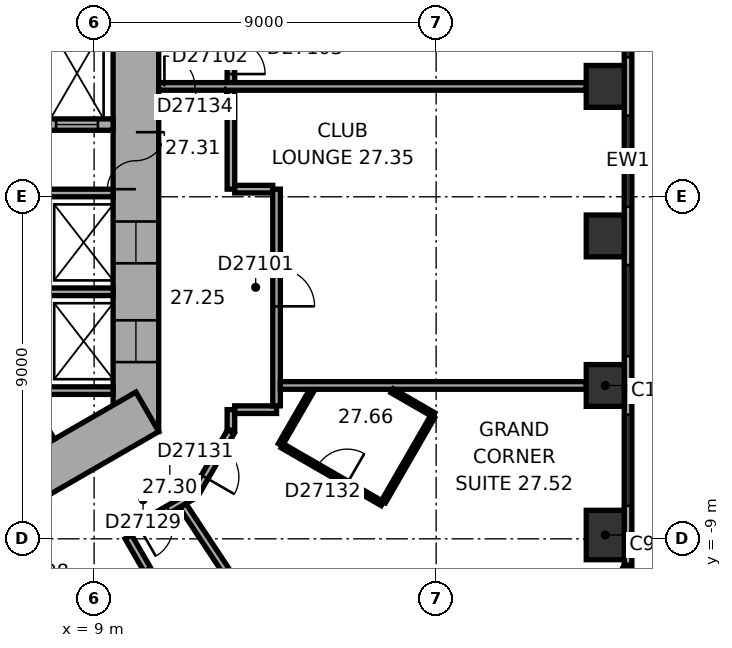
"""IFC4 building model, lengths in metres.
Left out: names, types, materials, properties, quantities, classifications, styles, units other than length and angle.
Written with IfcOpenShell. Run it as: python <this file> out.ifc"""

import sys

from ifc_helpers import new_model, si_unit, direction, frame, frame_2d, origin, origin_2d, place, context, subcontext, project, spatial, rectangle, extrude, element, fill, save


model = new_model("IFC4")
c1 = context("Model", 3, precision=1e-05, world=origin(), true_north=direction((0.0, 1.0)))
c2 = subcontext(c1, "Body", "Model", "MODEL_VIEW")
j1 = project(units=[si_unit("LENGTHUNIT", "METRE"), si_unit("PLANEANGLEUNIT", "RADIAN")], contexts=[c1])
p1 = place(None, origin())
s1 = spatial("IfcSite", under=j1, at=p1, CompositionType="ELEMENT")
p2 = place(p1, origin())
s2 = spatial("IfcBuilding", under=s1, at=p2, CompositionType="ELEMENT")
p3 = place(p2, frame((0.0, 0.0, 113.3)))
s3 = spatial("IfcBuildingStorey", under=s2, at=p3, CompositionType="ELEMENT", Elevation=113.3)
p4 = place(p3, frame((22.45, -8.899, 0.0), z_axis=(0.0, 0.0, 1.0), x_axis=(0.0, 1.0, 0.0)))
e1 = element("IfcColumn", 1, at=p4, inside=s3, PredefinedType="COLUMN", context=c2, shape_type="SweptSolid", body=[
    extrude(rectangle(XDim=1.3, YDim=1.0, at=origin_2d()), origin(), (0.0, 0.0, 1.0), 3.3),
])
for number, where, z_axis, x_axis in (
    (2, (22.45, -4.965, 0.0), (0.0, 0.0, 1.0), (0.0, 1.0, 0.0)),
    (3, (22.45, -1.03, 0.0), (0.0, 0.0, 1.0), (0.0, 1.0, 0.0)),
    (4, (22.45, 2.905, 0.0), (0.0, 0.0, 1.0), (0.0, 1.0, 0.0)),
):
    element("IfcColumn", number, at=place(p3, frame(where, z_axis=z_axis, x_axis=x_axis)), inside=s3, PredefinedType="COLUMN", context=c2, shape_type="SweptSolid", body=[
        extrude(rectangle(XDim=1.1, YDim=1.0, at=origin_2d()), origin(), (0.0, 0.0, 1.0), 3.3),
    ])
p5 = place(p3, frame((10.1, -6.177, 0.0), z_axis=(0.0, 0.0, 1.0), x_axis=(0.0, 1.0, 0.0)))
e5 = element("IfcWall", 5, at=p5, inside=s3, PredefinedType="SHEAR", context=c2, shape_type="SweptSolid", body=[
    extrude(rectangle(XDim=12.355, YDim=1.2, at=frame_2d((6.177, 0.0))), origin(), (0.0, 0.0, 1.0), 3.3),
])
p6 = place(p5, frame((6.378, 0.0, 0.0)))
e6 = element("IfcOpeningElement", 6, at=p6, cuts=e5, PredefinedType="OPENING", context=c2, shape_type="SweptSolid", body=[
    extrude(rectangle(XDim=1.5, YDim=2.1, at=frame_2d((0.75, 1.05))), frame((0.0, 0.61, 0.0), z_axis=(0.0, -1.0, 0.0), x_axis=(1.0, 0.0, 0.0)), (0.0, 0.0, 1.0), 1.22),
])
p7 = place(p5, frame((1.828, 0.0, 0.0)))
e7 = element("IfcOpeningElement", 7, at=p7, cuts=e5, PredefinedType="OPENING", context=c2, shape_type="SweptSolid", body=[
    extrude(rectangle(XDim=1.1, YDim=2.1, at=frame_2d((0.55, 1.05))), frame((0.0, 0.61, 0.0), z_axis=(0.0, -1.0, 0.0), x_axis=(1.0, 0.0, 0.0)), (0.0, 0.0, 1.0), 1.22),
])
p8 = place(p5, frame((4.427, 0.0, 0.0)))
e8 = element("IfcOpeningElement", 8, at=p8, cuts=e5, PredefinedType="OPENING", context=c2, shape_type="SweptSolid", body=[
    extrude(rectangle(XDim=1.1, YDim=2.1, at=frame_2d((0.55, 1.05))), frame((0.0, 0.61, 0.0), z_axis=(0.0, -1.0, 0.0), x_axis=(1.0, 0.0, 0.0)), (0.0, 0.0, 1.0), 1.22),
])
p9 = place(p3, frame((-0.3, -11.836, 0.0), z_axis=(0.0, 0.0, 1.0), x_axis=(0.866021384402, 0.500006961711, 0.0)))
e9 = element("IfcWall", 9, at=p9, inside=s3, PredefinedType="SHEAR", context=c2, shape_type="SweptSolid", body=[
    extrude(rectangle(XDim=12.355, YDim=1.2, at=frame_2d((6.178, 0.0))), origin(), (0.0, 0.0, 1.0), 3.3),
])
p10 = place(p9, frame((4.128, 0.0, 0.0)))
e10 = element("IfcOpeningElement", 10, at=p10, cuts=e9, PredefinedType="OPENING", context=c2, shape_type="SweptSolid", body=[
    extrude(rectangle(XDim=0.9, YDim=2.1, at=frame_2d((0.45, 1.05))), frame((0.0, 0.61, 0.0), z_axis=(0.0, -1.0, 0.0), x_axis=(1.0, 0.0, 0.0)), (0.0, 0.0, 1.0), 1.22),
])
p11 = place(p9, frame((7.928, 0.0, 0.0)))
e11 = element("IfcOpeningElement", 11, at=p11, cuts=e9, PredefinedType="OPENING", context=c2, shape_type="SweptSolid", body=[
    extrude(rectangle(XDim=1.1, YDim=2.1, at=frame_2d((0.55, 1.05))), frame((0.0, 0.61, 0.0), z_axis=(0.0, -1.0, 0.0), x_axis=(1.0, 0.0, 0.0)), (0.0, 0.0, 1.0), 1.22),
])
p12 = place(p3, frame((23.05, -9.687, 0.0), z_axis=(0.0, 0.0, 1.0), x_axis=(0.0, 1.0, 0.0)))
e12 = element("IfcWall", 12, at=p12, inside=s3, PredefinedType="STANDARD", context=c2, shape_type="SweptSolid", body=[
    extrude(rectangle(XDim=21.246, YDim=0.2, at=frame_2d((10.623, 0.0))), origin(), (0.0, 0.0, 1.0), 3.3),
])
p13 = place(p12, frame((1.555, 0.0, 0.8)))
e13 = element("IfcOpeningElement", 13, at=p13, cuts=e12, PredefinedType="OPENING", context=c2, shape_type="SweptSolid", body=[
    extrude(rectangle(XDim=2.4, YDim=1.7, at=frame_2d((1.2, 0.85))), frame((0.0, 0.11, 0.0), z_axis=(0.0, -1.0, 0.0), x_axis=(1.0, 0.0, 0.0)), (0.0, 0.0, 1.0), 0.22),
])
p14 = place(p12, frame((5.489, 0.0, 0.8)))
e14 = element("IfcOpeningElement", 14, at=p14, cuts=e12, PredefinedType="OPENING", context=c2, shape_type="SweptSolid", body=[
    extrude(rectangle(XDim=2.4, YDim=1.7, at=frame_2d((1.2, 0.85))), frame((0.0, 0.11, 0.0), z_axis=(0.0, -1.0, 0.0), x_axis=(1.0, 0.0, 0.0)), (0.0, 0.0, 1.0), 0.22),
])
p15 = place(p12, frame((9.424, 0.0, 0.8)))
e15 = element("IfcOpeningElement", 15, at=p15, cuts=e12, PredefinedType="OPENING", context=c2, shape_type="SweptSolid", body=[
    extrude(rectangle(XDim=2.4, YDim=1.7, at=frame_2d((1.2, 0.85))), frame((0.0, 0.11, 0.0), z_axis=(0.0, -1.0, 0.0), x_axis=(1.0, 0.0, 0.0)), (0.0, 0.0, 1.0), 0.22),
])
p16 = place(p12, frame((13.358, 0.0, 0.8)))
e16 = element("IfcOpeningElement", 16, at=p16, cuts=e12, PredefinedType="OPENING", context=c2, shape_type="SweptSolid", body=[
    extrude(rectangle(XDim=2.4, YDim=1.7, at=frame_2d((1.2, 0.85))), frame((0.0, 0.11, 0.0), z_axis=(0.0, -1.0, 0.0), x_axis=(1.0, 0.0, 0.0)), (0.0, 0.0, 1.0), 0.22),
])
p17 = place(p12, frame((17.293, 0.0, 0.8)))
e17 = element("IfcOpeningElement", 17, at=p17, cuts=e12, PredefinedType="OPENING", context=c2, shape_type="SweptSolid", body=[
    extrude(rectangle(XDim=2.4, YDim=1.7, at=frame_2d((1.2, 0.85))), frame((0.0, 0.11, 0.0), z_axis=(0.0, -1.0, 0.0), x_axis=(1.0, 0.0, 0.0)), (0.0, 0.0, 1.0), 0.22),
])
p18 = place(p3, frame((20.833, -13.839, 0.0), z_axis=(0.0, 0.0, 1.0), x_axis=(0.473321668581, 0.880889662813, 0.0)))
e18 = element("IfcWall", 18, at=p18, inside=s3, PredefinedType="STANDARD", context=c2, shape_type="SweptSolid", body=[
    extrude(rectangle(XDim=4.66, YDim=0.2, at=frame_2d((2.33, 0.0))), origin(), (0.0, 0.0, 1.0), 3.3),
])
p19 = place(p18, frame((0.83, 0.0, 0.8)))
e19 = element("IfcOpeningElement", 19, at=p19, cuts=e18, PredefinedType="OPENING", context=c2, shape_type="SweptSolid", body=[
    extrude(rectangle(XDim=3.0, YDim=1.7, at=frame_2d((1.5, 0.85))), frame((0.0, 0.11, 0.0), z_axis=(0.0, -1.0, 0.0), x_axis=(1.0, 0.0, 0.0)), (0.0, 0.0, 1.0), 0.22),
])
for number, where, z_axis, x_axis in (
    (20, (7.3, -5.1, 0.0), (0.0, 0.0, 1.0), (1.0, 0.0, 0.0)),
    (21, (7.3, -2.5, 0.0), (0.0, 0.0, 1.0), (1.0, 0.0, 0.0)),
    (22, (7.3, 0.1, 0.0), (0.0, 0.0, 1.0), (1.0, 0.0, 0.0)),
    (23, (6.768, -4.522, 0.0), (0.0, 0.0, 1.0), (0.5, -0.866, 0.0)),
):
    element("IfcWall", number, at=place(p3, frame(where, z_axis=z_axis, x_axis=x_axis)), inside=s3, PredefinedType="PARTITIONING", context=c2, shape_type="SweptSolid", body=[
        extrude(rectangle(XDim=2.2, YDim=0.2, at=frame_2d((1.1, 0.0))), origin(), (0.0, 0.0, 1.0), 3.05),
    ])
p20 = place(p3, frame((7.3, 1.9, 0.0), z_axis=(0.0, 0.0, 1.0), x_axis=(1.0, 0.0, 0.0)))
e24 = element("IfcWall", 24, at=p20, inside=s3, PredefinedType="SHEAR", context=c2, shape_type="SweptSolid", body=[
    extrude(rectangle(XDim=2.2, YDim=0.3, at=frame_2d((1.1, 0.0))), origin(), (0.0, 0.0, 1.0), 3.05),
])
p21 = place(p20, frame((0.7, 0.0, 0.0)))
e25 = element("IfcOpeningElement", 25, at=p21, cuts=e24, PredefinedType="OPENING", context=c2, shape_type="SweptSolid", body=[
    extrude(rectangle(XDim=1.1, YDim=2.1, at=frame_2d((0.55, 1.05))), frame((0.0, 0.16, 0.0), z_axis=(0.0, -1.0, 0.0), x_axis=(1.0, 0.0, 0.0)), (0.0, 0.0, 1.0), 0.32),
])
p22 = place(p3, frame((9.852, -8.861, 0.0), z_axis=(0.0, 0.0, 1.0), x_axis=(0.866013291437, 0.500020978615, 0.0)))
e26 = element("IfcWall", 26, at=p22, inside=s3, PredefinedType="PARTITIONING", context=c2, shape_type="SweptSolid", body=[
    extrude(rectangle(XDim=2.077, YDim=0.2, at=frame_2d((1.038, 0.0))), origin(), (0.0, 0.0, 1.0), 3.05),
])
p23 = place(p22, frame((0.372, 0.0, 0.0)))
e27 = element("IfcOpeningElement", 27, at=p23, cuts=e26, PredefinedType="OPENING", context=c2, shape_type="SweptSolid", body=[
    extrude(rectangle(XDim=0.9, YDim=2.1, at=frame_2d((0.45, 1.05))), frame((0.0, 0.11, 0.0), z_axis=(0.0, -1.0, 0.0), x_axis=(1.0, 0.0, 0.0)), (0.0, 0.0, 1.0), 0.22),
])
p24 = place(p3, frame((10.402, -9.815, 0.0), z_axis=(0.0, 0.0, 1.0), x_axis=(-0.499968756647, 0.866043441391, 0.0)))
e28 = element("IfcWall", 28, at=p24, inside=s3, PredefinedType="PARTITIONING", context=c2, shape_type="SweptSolid", body=[
    extrude(rectangle(XDim=1.001, YDim=0.2, at=frame_2d((0.5, 0.0))), origin(), (0.0, 0.0, 1.0), 3.05),
])
p25 = place(p3, frame((11.67, -7.788, 0.0), z_axis=(0.0, 0.0, 1.0), x_axis=(0.500063286585, 0.865988862174, 0.0)))
e29 = element("IfcWall", 29, at=p25, inside=s3, PredefinedType="PARTITIONING", context=c2, shape_type="SweptSolid", body=[
    extrude(rectangle(XDim=1.86, YDim=0.2, at=frame_2d((0.93, 0.0))), origin(), (0.0, 0.0, 1.0), 3.05),
])
p26 = place(p25, frame((0.48, 0.0, 0.0)))
e30 = element("IfcOpeningElement", 30, at=p26, cuts=e29, PredefinedType="OPENING", context=c2, shape_type="SweptSolid", body=[
    extrude(rectangle(XDim=0.9, YDim=2.1, at=frame_2d((0.45, 1.05))), frame((0.0, 0.11, 0.0), z_axis=(0.0, -1.0, 0.0), x_axis=(1.0, 0.0, 0.0)), (0.0, 0.0, 1.0), 0.22),
])
p27 = place(p3, frame((12.6, -6.138, 0.0), z_axis=(0.0, 0.0, 1.0), x_axis=(0.0, 1.0, 0.0)))
e31 = element("IfcWall", 31, at=p27, inside=s3, PredefinedType="PARTITIONING", context=c2, shape_type="SweptSolid", body=[
    extrude(rectangle(XDim=0.537, YDim=0.2, at=frame_2d((0.268, 0.0))), origin(), (0.0, 0.0, 1.0), 3.05),
])
p28 = place(p3, frame((12.6, 0.201, 0.0), z_axis=(0.0, 0.0, 1.0), x_axis=(0.0, 1.0, 0.0)))
e32 = element("IfcWall", 32, at=p28, inside=s3, PredefinedType="PARTITIONING", context=c2, shape_type="SweptSolid", body=[
    extrude(rectangle(XDim=2.604, YDim=0.2, at=frame_2d((1.302, 0.0))), origin(), (0.0, 0.0, 1.0), 3.05),
])
p29 = place(p3, frame((12.6, 3.004, 0.0), z_axis=(0.0, 0.0, 1.0), x_axis=(0.0, 1.0, 0.0)))
e33 = element("IfcWall", 33, at=p29, inside=s3, PredefinedType="PARTITIONING", context=c2, shape_type="SweptSolid", body=[
    extrude(rectangle(XDim=3.173, YDim=0.2, at=frame_2d((1.586, 0.0))), origin(), (0.0, 0.0, 1.0), 3.05),
])
p30 = place(p29, frame((0.225, 0.0, 0.0)))
e34 = element("IfcOpeningElement", 34, at=p30, cuts=e33, PredefinedType="OPENING", context=c2, shape_type="SweptSolid", body=[
    extrude(rectangle(XDim=0.9, YDim=2.1, at=frame_2d((0.45, 1.05))), frame((0.0, 0.11, 0.0), z_axis=(0.0, -1.0, 0.0), x_axis=(1.0, 0.0, 0.0)), (0.0, 0.0, 1.0), 0.22),
])
p31 = place(p3, frame((12.7, -5.601, 0.0), z_axis=(0.0, 0.0, 1.0), x_axis=(1.0, 0.0, 0.0)))
e35 = element("IfcWall", 35, at=p31, inside=s3, PredefinedType="PARTITIONING", context=c2, shape_type="SweptSolid", body=[
    extrude(rectangle(XDim=1.101, YDim=0.2, at=frame_2d((0.551, 0.0))), origin(), (0.0, 0.0, 1.0), 3.05),
])
p32 = place(p3, frame((13.701, 0.201, 0.0), z_axis=(0.0, 0.0, 1.0), x_axis=(-1.0, 0.0, 0.0)))
e36 = element("IfcWall", 36, at=p32, inside=s3, PredefinedType="PARTITIONING", context=c2, shape_type="SweptSolid", body=[
    extrude(rectangle(XDim=1.001, YDim=0.2, at=frame_2d((0.5, 0.0))), origin(), (0.0, 0.0, 1.0), 3.05),
])
p33 = place(p3, frame((13.801, -5.501, 0.0), z_axis=(0.0, 0.0, 1.0), x_axis=(0.0, 1.0, 0.0)))
e37 = element("IfcWall", 37, at=p33, inside=s3, PredefinedType="PARTITIONING", context=c2, shape_type="SweptSolid", body=[
    extrude(rectangle(XDim=5.702, YDim=0.2, at=frame_2d((2.851, 0.0))), origin(), (0.0, 0.0, 1.0), 3.05),
])
p34 = place(p33, frame((2.619, 0.0, 0.0)))
e38 = element("IfcOpeningElement", 38, at=p34, cuts=e37, PredefinedType="OPENING", context=c2, shape_type="SweptSolid", body=[
    extrude(rectangle(XDim=1.0, YDim=2.1, at=frame_2d((0.5, 1.05))), frame((0.0, 0.11, 0.0), z_axis=(0.0, -1.0, 0.0), x_axis=(1.0, 0.0, 0.0)), (0.0, 0.0, 1.0), 0.22),
])
p35 = place(p3, frame((13.901, -6.524, 0.0), z_axis=(0.0, 0.0, 1.0), x_axis=(0.499964162598, 0.86604609353, 0.0)))
e39 = element("IfcWall", 39, at=p35, inside=s3, PredefinedType="PARTITIONING", context=c2, shape_type="SweptSolid", body=[
    extrude(rectangle(XDim=1.661, YDim=0.12, at=frame_2d((0.831, 0.0))), origin(), (0.0, 0.0, 1.0), 3.05),
])
p36 = place(p3, frame((13.901, -4.965, 0.0), z_axis=(0.0, 0.0, 1.0), x_axis=(1.0, 0.0, 0.0)))
e40 = element("IfcWall", 40, at=p36, inside=s3, PredefinedType="PARTITIONING", context=c2, shape_type="SweptSolid", body=[
    extrude(rectangle(XDim=8.049, YDim=0.2, at=frame_2d((4.024, 0.0))), origin(), (0.0, 0.0, 1.0), 3.05),
])
p37 = place(p3, frame((16.255, -15.564, 0.0), z_axis=(0.0, 0.0, 1.0), x_axis=(-0.55192208744, 0.833895682562, 0.0)))
e41 = element("IfcWall", 41, at=p37, inside=s3, PredefinedType="PARTITIONING", context=c2, shape_type="SweptSolid", body=[
    extrude(rectangle(XDim=8.913, YDim=0.2, at=frame_2d((4.457, 0.0))), origin(), (0.0, 0.0, 1.0), 2.6),
])
p38 = place(p3, frame((16.585, -8.074, 0.0), z_axis=(0.0, 0.0, 1.0), x_axis=(-0.86601037836, 0.500026023896, 0.0)))
e42 = element("IfcWall", 42, at=p38, inside=s3, PredefinedType="PARTITIONING", context=c2, shape_type="SweptSolid", body=[
    extrude(rectangle(XDim=3.04, YDim=0.12, at=frame_2d((1.52, 0.0))), origin(), (0.0, 0.0, 1.0), 3.05),
])
p39 = place(p38, frame((1.07, 0.0, 0.0)))
e43 = element("IfcOpeningElement", 43, at=p39, cuts=e42, PredefinedType="OPENING", context=c2, shape_type="SweptSolid", body=[
    extrude(rectangle(XDim=0.9, YDim=2.1, at=frame_2d((0.45, 1.05))), frame((0.0, 0.07, 0.0), z_axis=(0.0, -1.0, 0.0), x_axis=(1.0, 0.0, 0.0)), (0.0, 0.0, 1.0), 0.14),
])
p40 = place(p3, frame((16.841, -5.104, 0.0), z_axis=(0.0, 0.0, 1.0), x_axis=(0.865998956469, -0.500045805297, 0.0)))
e44 = element("IfcWall", 44, at=p40, inside=s3, PredefinedType="PARTITIONING", context=c2, shape_type="SweptSolid", body=[
    extrude(rectangle(XDim=1.264, YDim=0.12, at=frame_2d((0.632, 0.0))), origin(), (0.0, 0.0, 1.0), 3.05),
])
p41 = place(p3, frame((17.906, -5.788, 0.0), z_axis=(0.0, 0.0, 1.0), x_axis=(-0.500047388771, -0.865998042136, 0.0)))
e45 = element("IfcWall", 45, at=p41, inside=s3, PredefinedType="PARTITIONING", context=c2, shape_type="SweptSolid", body=[
    extrude(rectangle(XDim=2.58, YDim=0.12, at=frame_2d((1.29, 0.0))), origin(), (0.0, 0.0, 1.0), 3.05),
])
p42 = place(p3, frame((21.95, 2.905, 0.0), z_axis=(0.0, 0.0, 1.0), x_axis=(-1.0, 0.0, 0.0)))
e46 = element("IfcWall", 46, at=p42, inside=s3, PredefinedType="PARTITIONING", context=c2, shape_type="SweptSolid", body=[
    extrude(rectangle(XDim=11.25, YDim=0.2, at=frame_2d((5.625, 0.0))), origin(), (0.0, 0.0, 1.0), 3.05),
])
p43 = place(p42, frame((9.5, 0.0, 0.0)))
e47 = element("IfcOpeningElement", 47, at=p43, cuts=e46, PredefinedType="OPENING", context=c2, shape_type="SweptSolid", body=[
    extrude(rectangle(XDim=1.6, YDim=2.1, at=frame_2d((0.8, 1.05))), frame((0.0, 0.11, 0.0), z_axis=(0.0, -1.0, 0.0), x_axis=(1.0, 0.0, 0.0)), (0.0, 0.0, 1.0), 0.22),
])
p44 = place(p13, origin())
e48 = element("IfcWindow", 48, at=p44, inside=s3, PartitioningType="SINGLE_PANEL", PredefinedType="WINDOW", context=c2, shape_type="SweptSolid", body=[
    extrude(rectangle(XDim=2.4, YDim=1.7, at=frame_2d((1.2, 0.85))), frame((0.0, 0.03, 0.0), z_axis=(0.0, -1.0, 0.0), x_axis=(1.0, 0.0, 0.0)), (0.0, 0.0, 1.0), 0.06),
])
fill(e13, e48)
p45 = place(p14, origin())
e49 = element("IfcWindow", 49, at=p45, inside=s3, PartitioningType="SINGLE_PANEL", PredefinedType="WINDOW", context=c2, shape_type="SweptSolid", body=[
    extrude(rectangle(XDim=2.4, YDim=1.7, at=frame_2d((1.2, 0.85))), frame((0.0, 0.03, 0.0), z_axis=(0.0, -1.0, 0.0), x_axis=(1.0, 0.0, 0.0)), (0.0, 0.0, 1.0), 0.06),
])
fill(e14, e49)
p46 = place(p15, origin())
e50 = element("IfcWindow", 50, at=p46, inside=s3, PartitioningType="SINGLE_PANEL", PredefinedType="WINDOW", context=c2, shape_type="SweptSolid", body=[
    extrude(rectangle(XDim=2.4, YDim=1.7, at=frame_2d((1.2, 0.85))), frame((0.0, 0.03, 0.0), z_axis=(0.0, -1.0, 0.0), x_axis=(1.0, 0.0, 0.0)), (0.0, 0.0, 1.0), 0.06),
])
fill(e15, e50)
p47 = place(p16, origin())
e51 = element("IfcWindow", 51, at=p47, inside=s3, PartitioningType="SINGLE_PANEL", PredefinedType="WINDOW", context=c2, shape_type="SweptSolid", body=[
    extrude(rectangle(XDim=2.4, YDim=1.7, at=frame_2d((1.2, 0.85))), frame((0.0, 0.03, 0.0), z_axis=(0.0, -1.0, 0.0), x_axis=(1.0, 0.0, 0.0)), (0.0, 0.0, 1.0), 0.06),
])
fill(e16, e51)
p48 = place(p6, origin())
e52 = element("IfcDoor", 52, at=p48, inside=s3, OperationType="DOUBLE_DOOR_SINGLE_SWING", PredefinedType="DOOR", context=c2, shape_type="SweptSolid", body=[
    extrude(rectangle(XDim=1.5, YDim=2.1, at=frame_2d((0.75, 1.05))), frame((0.0, 0.025, 0.0), z_axis=(0.0, -1.0, 0.0), x_axis=(1.0, 0.0, 0.0)), (0.0, 0.0, 1.0), 0.05),
])
fill(e6, e52)
p49 = place(p21, origin())
e53 = element("IfcDoor", 53, at=p49, inside=s3, OperationType="DOUBLE_DOOR_SLIDING", PredefinedType="DOOR", context=c2, shape_type="SweptSolid", body=[
    extrude(rectangle(XDim=1.1, YDim=2.1, at=frame_2d((0.55, 1.05))), frame((0.0, 0.025, 0.0), z_axis=(0.0, -1.0, 0.0), x_axis=(1.0, 0.0, 0.0)), (0.0, 0.0, 1.0), 0.05),
])
fill(e25, e53)
p50 = place(p7, origin())
e54 = element("IfcDoor", 54, at=p50, inside=s3, OperationType="DOUBLE_DOOR_SLIDING", PredefinedType="DOOR", context=c2, shape_type="SweptSolid", body=[
    extrude(rectangle(XDim=1.1, YDim=2.1, at=frame_2d((0.55, 1.05))), frame((0.0, 0.025, 0.0), z_axis=(0.0, -1.0, 0.0), x_axis=(1.0, 0.0, 0.0)), (0.0, 0.0, 1.0), 0.05),
])
fill(e7, e54)
p51 = place(p8, origin())
e55 = element("IfcDoor", 55, at=p51, inside=s3, OperationType="DOUBLE_DOOR_SLIDING", PredefinedType="DOOR", context=c2, shape_type="SweptSolid", body=[
    extrude(rectangle(XDim=1.1, YDim=2.1, at=frame_2d((0.55, 1.05))), frame((0.0, 0.025, 0.0), z_axis=(0.0, -1.0, 0.0), x_axis=(1.0, 0.0, 0.0)), (0.0, 0.0, 1.0), 0.05),
])
fill(e8, e55)
p52 = place(p34, origin())
e56 = element("IfcDoor", 56, at=p52, inside=s3, OperationType="SINGLE_SWING_LEFT", PredefinedType="DOOR", context=c2, shape_type="SweptSolid", body=[
    extrude(rectangle(XDim=1.0, YDim=2.1, at=frame_2d((0.5, 1.05))), frame((0.0, 0.025, 0.0), z_axis=(0.0, -1.0, 0.0), x_axis=(1.0, 0.0, 0.0)), (0.0, 0.0, 1.0), 0.05),
])
fill(e38, e56)
p53 = place(p30, origin())
e57 = element("IfcDoor", 57, at=p53, inside=s3, OperationType="SINGLE_SWING_LEFT", PredefinedType="DOOR", context=c2, shape_type="SweptSolid", body=[
    extrude(rectangle(XDim=0.9, YDim=2.1, at=frame_2d((0.45, 1.05))), frame((0.0, 0.025, 0.0), z_axis=(0.0, -1.0, 0.0), x_axis=(1.0, 0.0, 0.0)), (0.0, 0.0, 1.0), 0.05),
])
fill(e34, e57)
p54 = place(p23, origin())
e58 = element("IfcDoor", 58, at=p54, inside=s3, OperationType="SINGLE_SWING_LEFT", PredefinedType="DOOR", context=c2, shape_type="SweptSolid", body=[
    extrude(rectangle(XDim=0.9, YDim=2.1, at=frame_2d((0.45, 1.05))), frame((0.0, 0.025, 0.0), z_axis=(0.0, -1.0, 0.0), x_axis=(1.0, 0.0, 0.0)), (0.0, 0.0, 1.0), 0.05),
])
fill(e27, e58)
p55 = place(p26, origin())
e59 = element("IfcDoor", 59, at=p55, inside=s3, OperationType="SINGLE_SWING_LEFT", PredefinedType="DOOR", context=c2, shape_type="SweptSolid", body=[
    extrude(rectangle(XDim=0.9, YDim=2.1, at=frame_2d((0.45, 1.05))), frame((0.0, 0.025, 0.0), z_axis=(0.0, -1.0, 0.0), x_axis=(1.0, 0.0, 0.0)), (0.0, 0.0, 1.0), 0.05),
])
fill(e30, e59)
p56 = place(p39, origin())
e60 = element("IfcDoor", 60, at=p56, inside=s3, OperationType="SINGLE_SWING_LEFT", PredefinedType="DOOR", context=c2, shape_type="SweptSolid", body=[
    extrude(rectangle(XDim=0.9, YDim=2.1, at=frame_2d((0.45, 1.05))), frame((0.0, 0.025, 0.0), z_axis=(0.0, -1.0, 0.0), x_axis=(1.0, 0.0, 0.0)), (0.0, 0.0, 1.0), 0.05),
])
fill(e43, e60)
p57 = place(p43, origin())
e61 = element("IfcDoor", 61, at=p57, inside=s3, OperationType="DOUBLE_DOOR_SINGLE_SWING", PredefinedType="DOOR", context=c2, shape_type="SweptSolid", body=[
    extrude(rectangle(XDim=1.6, YDim=2.1, at=frame_2d((0.8, 1.05))), frame((0.0, 0.025, 0.0), z_axis=(0.0, -1.0, 0.0), x_axis=(1.0, 0.0, 0.0)), (0.0, 0.0, 1.0), 0.05),
])
fill(e47, e61)
save(model, sys.argv[1])
